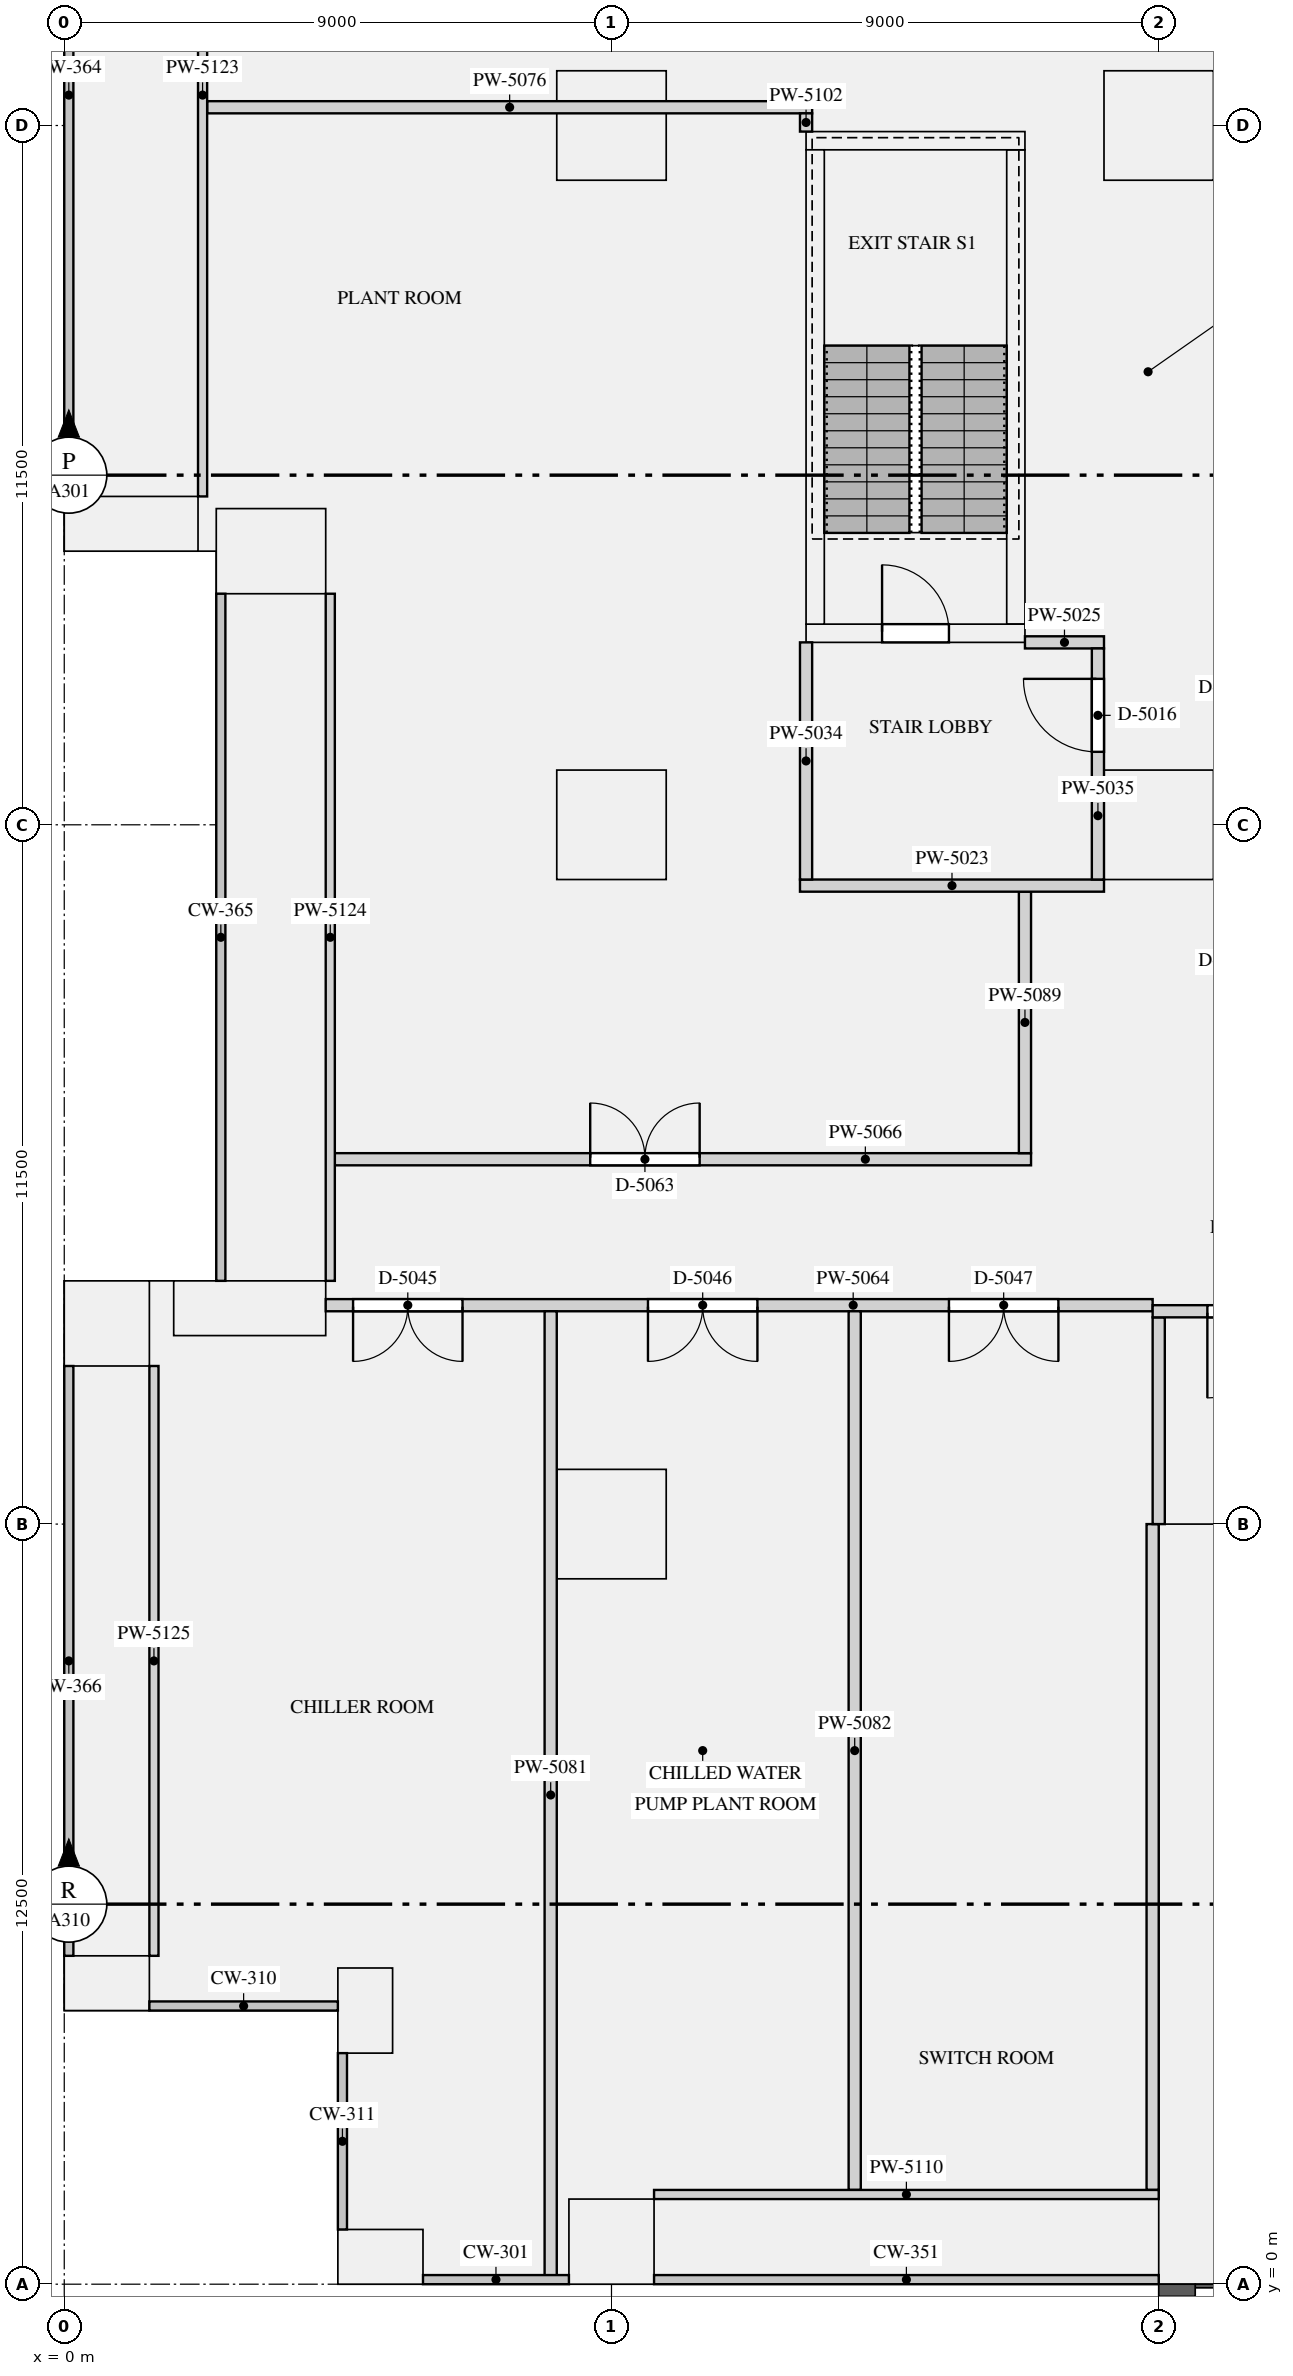
"""IFC4 building model, lengths in metres.
Left out: names, types, materials, properties, quantities, classifications, styles, units other than length and angle.
Written with IfcOpenShell. Run it as: python <this file> out.ifc"""

import sys

from ifc_helpers import new_model, si_unit, direction, frame, frame_2d, origin, origin_2d, place, context, subcontext, project, spatial, rectangle, extrude, element, fill, save


model = new_model("IFC4")
c1 = context("Model", 3, precision=1e-05, world=origin(), true_north=direction((0.0, 1.0)))
c2 = subcontext(c1, "Body", "Model", "MODEL_VIEW")
j1 = project(units=[si_unit("LENGTHUNIT", "METRE"), si_unit("PLANEANGLEUNIT", "RADIAN")], contexts=[c1])
p1 = place(None, origin())
s1 = spatial("IfcSite", under=j1, at=p1, CompositionType="ELEMENT")
p2 = place(p1, origin())
s2 = spatial("IfcBuilding", under=s1, at=p2, CompositionType="ELEMENT")
p3 = place(p2, frame((0.0, 0.0, 15.5)))
s3 = spatial("IfcBuildingStorey", under=s2, at=p3, CompositionType="ELEMENT", Elevation=15.5)
p4 = place(p3, frame((9.0, 0.7, 0.0), z_axis=(0.0, 0.0, 1.0), x_axis=(1.0, 0.0, 0.0)))
e1 = element("IfcColumn", 1, at=p4, inside=s3, PredefinedType="USERDEFINED", context=c2, shape_type="SweptSolid", body=[
    extrude(rectangle(XDim=1.4, YDim=1.4, at=origin_2d()), origin(), (0.0, 0.0, 1.0), 4.0),
])
p5 = place(p3, frame((1.1, 28.95, 0.0), z_axis=(0.0, 0.0, 1.0), x_axis=(1.0, 0.0, 0.0)))
e2 = element("IfcColumn", 2, at=p5, inside=s3, PredefinedType="USERDEFINED", context=c2, shape_type="SweptSolid", body=[
    extrude(rectangle(XDim=2.2, YDim=0.9, at=origin_2d()), origin(), (0.0, 0.0, 1.0), 4.0),
])
p6 = place(p3, frame((3.4, 28.5, 0.0), z_axis=(0.0, 0.0, 1.0), x_axis=(0.0, -1.0, 0.0)))
e3 = element("IfcColumn", 3, at=p6, inside=s3, PredefinedType="USERDEFINED", context=c2, shape_type="SweptSolid", body=[
    extrude(rectangle(XDim=1.4, YDim=1.8, at=origin_2d()), origin(), (0.0, 0.0, 1.0), 4.0),
])
p7 = place(p3, frame((3.05, 16.05, 0.0), z_axis=(0.0, 0.0, 1.0), x_axis=(-1.0, 0.0, 0.0)))
e4 = element("IfcColumn", 4, at=p7, inside=s3, PredefinedType="USERDEFINED", context=c2, shape_type="SweptSolid", body=[
    extrude(rectangle(XDim=2.5, YDim=0.9, at=origin_2d()), origin(), (0.0, 0.0, 1.0), 4.0),
])
p8 = place(p3, frame((0.7, 15.8, 0.0), z_axis=(0.0, 0.0, 1.0), x_axis=(0.0, -1.0, 0.0)))
e5 = element("IfcColumn", 5, at=p8, inside=s3, PredefinedType="USERDEFINED", context=c2, shape_type="SweptSolid", body=[
    extrude(rectangle(XDim=1.4, YDim=1.4, at=origin_2d()), origin(), (0.0, 0.0, 1.0), 4.0),
])
for number, where, z_axis, x_axis in (
    (6, (0.7, 4.95, 0.0), (0.0, 0.0, 1.0), (1.0, 0.0, 0.0)),
    (7, (4.95, 4.5, 0.0), (0.0, 0.0, 1.0), (0.0, -1.0, 0.0)),
    (8, (5.2, 0.45, 0.0), (0.0, 0.0, 1.0), (1.0, 0.0, 0.0)),
):
    element("IfcColumn", number, at=place(p3, frame(where, z_axis=z_axis, x_axis=x_axis)), inside=s3, PredefinedType="USERDEFINED", context=c2, shape_type="SweptSolid", body=[
        extrude(rectangle(XDim=1.4, YDim=0.9, at=origin_2d()), origin(), (0.0, 0.0, 1.0), 4.0),
    ])
for number, where, z_axis, x_axis in (
    (9, (9.0, 12.5, 0.0), (0.0, 0.0, 1.0), (1.0, 0.0, 0.0)),
    (10, (9.0, 24.0, 0.0), (0.0, 0.0, 1.0), (1.0, 0.0, 0.0)),
    (11, (9.0, 35.5, 0.0), (0.0, 0.0, 1.0), (1.0, 0.0, 0.0)),
    (12, (18.0, 24.0, 0.0), (0.0, 0.0, 1.0), (1.0, 0.0, 0.0)),
    (13, (18.0, 35.5, 0.0), (0.0, 0.0, 1.0), (1.0, 0.0, 0.0)),
):
    element("IfcColumn", number, at=place(p3, frame(where, z_axis=z_axis, x_axis=x_axis)), inside=s3, PredefinedType="COLUMN", context=c2, shape_type="SweptSolid", body=[
        extrude(rectangle(XDim=1.8, YDim=1.8, at=origin_2d()), origin(), (0.0, 0.0, 1.0), 4.0),
    ])
p9 = place(p3, frame((18.5, 0.0, 0.0), z_axis=(0.0, 0.0, 1.0), x_axis=(0.0, 1.0, 0.0)))
e14 = element("IfcWall", 14, at=p9, inside=s3, PredefinedType="SHEAR", context=c2, shape_type="SweptSolid", body=[
    extrude(rectangle(XDim=12.5, YDim=1.0, at=frame_2d((6.25, 0.0))), origin(), (0.0, 0.0, 1.0), 4.0),
])
p10 = place(p3, frame((12.2, 27.15, 0.0), z_axis=(0.0, 0.0, 1.0), x_axis=(1.0, 0.0, 0.0)))
e15 = element("IfcWall", 15, at=p10, inside=s3, PredefinedType="SHEAR", context=c2, shape_type="SweptSolid", body=[
    extrude(rectangle(XDim=3.6, YDim=0.3, at=frame_2d((1.8, 0.0))), origin(), (0.0, 0.0, 1.0), 4.0),
])
p11 = place(p10, frame((1.25, 0.0, 0.0)))
e16 = element("IfcOpeningElement", 16, at=p11, cuts=e15, PredefinedType="OPENING", context=c2, shape_type="SweptSolid", body=[
    extrude(rectangle(XDim=1.1, YDim=2.1, at=frame_2d((0.55, 1.05))), frame((0.0, 0.16, 0.0), z_axis=(0.0, -1.0, 0.0), x_axis=(1.0, 0.0, 0.0)), (0.0, 0.0, 1.0), 0.32),
])
p12 = place(p3, frame((12.2, 35.25, 0.0), z_axis=(0.0, 0.0, 1.0), x_axis=(1.0, 0.0, 0.0)))
e17 = element("IfcWall", 17, at=p12, inside=s3, PredefinedType="SHEAR", context=c2, shape_type="SweptSolid", body=[
    extrude(rectangle(XDim=3.6, YDim=0.3, at=frame_2d((1.8, 0.0))), origin(), (0.0, 0.0, 1.0), 4.0),
])
for number, where, z_axis, x_axis in (
    (18, (12.35, 27.3, 0.0), (0.0, 0.0, 1.0), (0.0, 1.0, 0.0)),
    (19, (15.65, 27.3, 0.0), (0.0, 0.0, 1.0), (0.0, 1.0, 0.0)),
):
    element("IfcWall", number, at=place(p3, frame(where, z_axis=z_axis, x_axis=x_axis)), inside=s3, PredefinedType="SHEAR", context=c2, shape_type="SweptSolid", body=[
        extrude(rectangle(XDim=7.8, YDim=0.3, at=frame_2d((3.9, 0.0))), origin(), (0.0, 0.0, 1.0), 4.0),
    ])
p13 = place(p3, frame((12.1, 23.0, 0.0), z_axis=(0.0, 0.0, 1.0), x_axis=(1.0, 0.0, 0.0)))
e20 = element("IfcWall", 20, at=p13, inside=s3, PredefinedType="PARTITIONING", context=c2, shape_type="SweptSolid", body=[
    extrude(rectangle(XDim=5.0, YDim=0.2, at=frame_2d((2.5, 0.0))), origin(), (0.0, 0.0, 1.0), 3.68),
])
p14 = place(p3, frame((15.8, 27.0, 0.0), z_axis=(0.0, 0.0, 1.0), x_axis=(1.0, 0.0, 0.0)))
e21 = element("IfcWall", 21, at=p14, inside=s3, PredefinedType="PARTITIONING", context=c2, shape_type="SweptSolid", body=[
    extrude(rectangle(XDim=1.3, YDim=0.2, at=frame_2d((0.65, 0.0))), origin(), (0.0, 0.0, 1.0), 3.68),
])
p15 = place(p3, frame((18.0, 12.5, 0.0), z_axis=(0.0, 0.0, 1.0), x_axis=(0.0, 1.0, 0.0)))
e22 = element("IfcWall", 22, at=p15, inside=s3, PredefinedType="PARTITIONING", context=c2, shape_type="SweptSolid", body=[
    extrude(rectangle(XDim=3.4, YDim=0.2, at=frame_2d((1.7, 0.0))), origin(), (0.0, 0.0, 1.0), 3.68),
])
p16 = place(p3, frame((12.2, 23.1, 0.0), z_axis=(0.0, 0.0, 1.0), x_axis=(0.0, 1.0, 0.0)))
e23 = element("IfcWall", 23, at=p16, inside=s3, PredefinedType="PARTITIONING", context=c2, shape_type="SweptSolid", body=[
    extrude(rectangle(XDim=3.9, YDim=0.2, at=frame_2d((1.95, 0.0))), origin(), (0.0, 0.0, 1.0), 3.68),
])
p17 = place(p3, frame((17.0, 23.1, 0.0), z_axis=(0.0, 0.0, 1.0), x_axis=(0.0, 1.0, 0.0)))
e24 = element("IfcWall", 24, at=p17, inside=s3, PredefinedType="PARTITIONING", context=c2, shape_type="SweptSolid", body=[
    extrude(rectangle(XDim=3.8, YDim=0.2, at=frame_2d((1.9, 0.0))), origin(), (0.0, 0.0, 1.0), 3.68),
])
p18 = place(p17, frame((2.1, 0.0, 0.0)))
e25 = element("IfcOpeningElement", 25, at=p18, cuts=e24, PredefinedType="OPENING", context=c2, shape_type="SweptSolid", body=[
    extrude(rectangle(XDim=1.2, YDim=2.1, at=frame_2d((0.6, 1.05))), frame((0.0, 0.11, 0.0), z_axis=(0.0, -1.0, 0.0), x_axis=(1.0, 0.0, 0.0)), (0.0, 0.0, 1.0), 0.22),
])
p19 = place(p3, frame((17.9, 16.0, 0.0), z_axis=(0.0, 0.0, 1.0), x_axis=(1.0, 0.0, 0.0)))
e26 = element("IfcWall", 26, at=p19, inside=s3, PredefinedType="PARTITIONING", context=c2, shape_type="SweptSolid", body=[
    extrude(rectangle(XDim=36.2, YDim=0.2, at=frame_2d((18.1, 0.0))), origin(), (0.0, 0.0, 1.0), 3.68),
])
p20 = place(p19, frame((0.9, 0.0, 0.0)))
e27 = element("IfcOpeningElement", 27, at=p20, cuts=e26, PredefinedType="OPENING", context=c2, shape_type="SweptSolid", body=[
    extrude(rectangle(XDim=1.4, YDim=2.1, at=frame_2d((0.7, 1.05))), frame((0.0, 0.11, 0.0), z_axis=(0.0, -1.0, 0.0), x_axis=(1.0, 0.0, 0.0)), (0.0, 0.0, 1.0), 0.22),
])
p21 = place(p19, frame((33.9, 0.0, 0.0)))
e28 = element("IfcOpeningElement", 28, at=p21, cuts=e26, PredefinedType="OPENING", context=c2, shape_type="SweptSolid", body=[
    extrude(rectangle(XDim=1.4, YDim=2.1, at=frame_2d((0.7, 1.05))), frame((0.0, 0.11, 0.0), z_axis=(0.0, -1.0, 0.0), x_axis=(1.0, 0.0, 0.0)), (0.0, 0.0, 1.0), 0.22),
])
p22 = place(p3, frame((4.3, 16.1, 0.0), z_axis=(0.0, 0.0, 1.0), x_axis=(1.0, 0.0, 0.0)))
e29 = element("IfcWall", 29, at=p22, inside=s3, PredefinedType="PARTITIONING", context=c2, shape_type="SweptSolid", body=[
    extrude(rectangle(XDim=13.6, YDim=0.2, at=frame_2d((6.8, 0.0))), origin(), (0.0, 0.0, 1.0), 3.68),
])
p23 = place(p22, frame((0.45, 0.0, 0.0)))
e30 = element("IfcOpeningElement", 30, at=p23, cuts=e29, PredefinedType="OPENING", context=c2, shape_type="SweptSolid", body=[
    extrude(rectangle(XDim=1.8, YDim=2.1, at=frame_2d((0.9, 1.05))), frame((0.0, 0.11, 0.0), z_axis=(0.0, -1.0, 0.0), x_axis=(1.0, 0.0, 0.0)), (0.0, 0.0, 1.0), 0.22),
])
p24 = place(p22, frame((5.3, 0.0, 0.0)))
e31 = element("IfcOpeningElement", 31, at=p24, cuts=e29, PredefinedType="OPENING", context=c2, shape_type="SweptSolid", body=[
    extrude(rectangle(XDim=1.8, YDim=2.1, at=frame_2d((0.9, 1.05))), frame((0.0, 0.11, 0.0), z_axis=(0.0, -1.0, 0.0), x_axis=(1.0, 0.0, 0.0)), (0.0, 0.0, 1.0), 0.22),
])
p25 = place(p22, frame((10.25, 0.0, 0.0)))
e32 = element("IfcOpeningElement", 32, at=p25, cuts=e29, PredefinedType="OPENING", context=c2, shape_type="SweptSolid", body=[
    extrude(rectangle(XDim=1.8, YDim=2.1, at=frame_2d((0.9, 1.05))), frame((0.0, 0.11, 0.0), z_axis=(0.0, -1.0, 0.0), x_axis=(1.0, 0.0, 0.0)), (0.0, 0.0, 1.0), 0.22),
])
p26 = place(p3, frame((4.45, 18.5, 0.0), z_axis=(0.0, 0.0, 1.0), x_axis=(1.0, 0.0, 0.0)))
e33 = element("IfcWall", 33, at=p26, inside=s3, PredefinedType="PARTITIONING", context=c2, shape_type="SweptSolid", body=[
    extrude(rectangle(XDim=11.45, YDim=0.2, at=frame_2d((5.725, 0.0))), origin(), (0.0, 0.0, 1.0), 3.68),
])
p27 = place(p26, frame((4.2, 0.0, 0.0)))
e34 = element("IfcOpeningElement", 34, at=p27, cuts=e33, PredefinedType="OPENING", context=c2, shape_type="SweptSolid", body=[
    extrude(rectangle(XDim=1.8, YDim=2.1, at=frame_2d((0.9, 1.05))), frame((0.0, 0.11, 0.0), z_axis=(0.0, -1.0, 0.0), x_axis=(1.0, 0.0, 0.0)), (0.0, 0.0, 1.0), 0.22),
])
p28 = place(p3, frame((2.35, 35.8, 0.0), z_axis=(0.0, 0.0, 1.0), x_axis=(1.0, 0.0, 0.0)))
e35 = element("IfcWall", 35, at=p28, inside=s3, PredefinedType="PARTITIONING", context=c2, shape_type="SweptSolid", body=[
    extrude(rectangle(XDim=9.95, YDim=0.2, at=frame_2d((4.975, 0.0))), origin(), (0.0, 0.0, 1.0), 3.68),
])
p29 = place(p3, frame((8.0, 0.09, 0.0), z_axis=(0.0, 0.0, 1.0), x_axis=(0.0, 1.0, 0.0)))
e36 = element("IfcWall", 36, at=p29, inside=s3, PredefinedType="PARTITIONING", context=c2, shape_type="SweptSolid", body=[
    extrude(rectangle(XDim=15.91, YDim=0.2, at=frame_2d((7.955, 0.0))), origin(), (0.0, 0.0, 1.0), 3.68),
])
p30 = place(p3, frame((13.0, 1.55, 0.0), z_axis=(0.0, 0.0, 1.0), x_axis=(0.0, 1.0, 0.0)))
e37 = element("IfcWall", 37, at=p30, inside=s3, PredefinedType="PARTITIONING", context=c2, shape_type="SweptSolid", body=[
    extrude(rectangle(XDim=14.45, YDim=0.2, at=frame_2d((7.225, 0.0))), origin(), (0.0, 0.0, 1.0), 3.68),
])
p31 = place(p3, frame((17.9, 1.55, 0.0), z_axis=(0.0, 0.0, 1.0), x_axis=(0.0, 1.0, 0.0)))
e38 = element("IfcWall", 38, at=p31, inside=s3, PredefinedType="PARTITIONING", context=c2, shape_type="SweptSolid", body=[
    extrude(rectangle(XDim=10.95, YDim=0.2, at=frame_2d((5.475, 0.0))), origin(), (0.0, 0.0, 1.0), 3.68),
])
p32 = place(p3, frame((15.8, 18.6, 0.0), z_axis=(0.0, 0.0, 1.0), x_axis=(0.0, 1.0, 0.0)))
e39 = element("IfcWall", 39, at=p32, inside=s3, PredefinedType="PARTITIONING", context=c2, shape_type="SweptSolid", body=[
    extrude(rectangle(XDim=4.3, YDim=0.2, at=frame_2d((2.15, 0.0))), origin(), (0.0, 0.0, 1.0), 3.68),
])
p33 = place(p3, frame((12.2, 35.4, 0.0), z_axis=(0.0, 0.0, 1.0), x_axis=(0.0, 1.0, 0.0)))
e40 = element("IfcWall", 40, at=p33, inside=s3, PredefinedType="PARTITIONING", context=c2, shape_type="SweptSolid", body=[
    extrude(rectangle(XDim=0.3, YDim=0.2, at=frame_2d((0.15, 0.0))), origin(), (0.0, 0.0, 1.0), 3.68),
])
p34 = place(p3, frame((9.7, 1.475, 0.0), z_axis=(0.0, 0.0, 1.0), x_axis=(1.0, 0.0, 0.0)))
e41 = element("IfcWall", 41, at=p34, inside=s3, PredefinedType="PARTITIONING", context=c2, shape_type="SweptSolid", body=[
    extrude(rectangle(XDim=8.3, YDim=0.15, at=frame_2d((4.15, 0.0))), origin(), (0.0, 0.0, 1.0), 3.68),
])
p35 = place(p3, frame((2.275, 29.4, 0.0), z_axis=(0.0, 0.0, 1.0), x_axis=(0.0, 1.0, 0.0)))
e42 = element("IfcWall", 42, at=p35, inside=s3, PredefinedType="PARTITIONING", context=c2, shape_type="SweptSolid", body=[
    extrude(rectangle(XDim=13.2, YDim=0.15, at=frame_2d((6.6, 0.0))), origin(), (0.0, 0.0, 1.0), 3.68),
])
p36 = place(p3, frame((4.375, 16.5, 0.0), z_axis=(0.0, 0.0, 1.0), x_axis=(0.0, 1.0, 0.0)))
e43 = element("IfcWall", 43, at=p36, inside=s3, PredefinedType="PARTITIONING", context=c2, shape_type="SweptSolid", body=[
    extrude(rectangle(XDim=11.3, YDim=0.15, at=frame_2d((5.65, 0.0))), origin(), (0.0, 0.0, 1.0), 3.68),
])
p37 = place(p3, frame((1.475, 5.4, 0.0), z_axis=(0.0, 0.0, 1.0), x_axis=(0.0, 1.0, 0.0)))
e44 = element("IfcWall", 44, at=p37, inside=s3, PredefinedType="PARTITIONING", context=c2, shape_type="SweptSolid", body=[
    extrude(rectangle(XDim=9.7, YDim=0.15, at=frame_2d((4.85, 0.0))), origin(), (0.0, 0.0, 1.0), 3.68),
])
p38 = place(p11, origin())
e45 = element("IfcDoor", 45, at=p38, inside=s3, OperationType="SINGLE_SWING_LEFT", PredefinedType="DOOR", context=c2, shape_type="SweptSolid", body=[
    extrude(rectangle(XDim=1.1, YDim=2.1, at=frame_2d((0.55, 1.05))), frame((0.0, 0.025, 0.0), z_axis=(0.0, -1.0, 0.0), x_axis=(1.0, 0.0, 0.0)), (0.0, 0.0, 1.0), 0.05),
])
fill(e16, e45)
p39 = place(p18, origin())
e46 = element("IfcDoor", 46, at=p39, inside=s3, OperationType="SINGLE_SWING_RIGHT", PredefinedType="DOOR", context=c2, shape_type="SweptSolid", body=[
    extrude(rectangle(XDim=1.2, YDim=2.1, at=frame_2d((0.6, 1.05))), frame((0.0, 0.025, 0.0), z_axis=(0.0, -1.0, 0.0), x_axis=(1.0, 0.0, 0.0)), (0.0, 0.0, 1.0), 0.05),
])
fill(e25, e46)
p40 = place(p20, frame((1.4, 0.0, 0.0), z_axis=(0.0, 0.0, 1.0), x_axis=(-1.0, 0.0, 0.0)))
e47 = element("IfcDoor", 47, at=p40, inside=s3, OperationType="SINGLE_SWING_RIGHT", PredefinedType="DOOR", context=c2, shape_type="SweptSolid", body=[
    extrude(rectangle(XDim=1.4, YDim=2.1, at=frame_2d((0.7, 1.05))), frame((0.0, 0.025, 0.0), z_axis=(0.0, -1.0, 0.0), x_axis=(1.0, 0.0, 0.0)), (0.0, 0.0, 1.0), 0.05),
])
fill(e27, e47)
p41 = place(p23, frame((1.8, 0.0, 0.0), z_axis=(0.0, 0.0, 1.0), x_axis=(-1.0, 0.0, 0.0)))
e48 = element("IfcDoor", 48, at=p41, inside=s3, OperationType="DOUBLE_DOOR_SINGLE_SWING", PredefinedType="DOOR", context=c2, shape_type="SweptSolid", body=[
    extrude(rectangle(XDim=1.8, YDim=2.1, at=frame_2d((0.9, 1.05))), frame((0.0, 0.025, 0.0), z_axis=(0.0, -1.0, 0.0), x_axis=(1.0, 0.0, 0.0)), (0.0, 0.0, 1.0), 0.05),
])
fill(e30, e48)
p42 = place(p24, frame((1.8, 0.0, 0.0), z_axis=(0.0, 0.0, 1.0), x_axis=(-1.0, 0.0, 0.0)))
e49 = element("IfcDoor", 49, at=p42, inside=s3, OperationType="DOUBLE_DOOR_SINGLE_SWING", PredefinedType="DOOR", context=c2, shape_type="SweptSolid", body=[
    extrude(rectangle(XDim=1.8, YDim=2.1, at=frame_2d((0.9, 1.05))), frame((0.0, 0.025, 0.0), z_axis=(0.0, -1.0, 0.0), x_axis=(1.0, 0.0, 0.0)), (0.0, 0.0, 1.0), 0.05),
])
fill(e31, e49)
p43 = place(p25, frame((1.8, 0.0, 0.0), z_axis=(0.0, 0.0, 1.0), x_axis=(-1.0, 0.0, 0.0)))
e50 = element("IfcDoor", 50, at=p43, inside=s3, OperationType="DOUBLE_DOOR_SINGLE_SWING", PredefinedType="DOOR", context=c2, shape_type="SweptSolid", body=[
    extrude(rectangle(XDim=1.8, YDim=2.1, at=frame_2d((0.9, 1.05))), frame((0.0, 0.025, 0.0), z_axis=(0.0, -1.0, 0.0), x_axis=(1.0, 0.0, 0.0)), (0.0, 0.0, 1.0), 0.05),
])
fill(e32, e50)
p44 = place(p27, origin())
e51 = element("IfcDoor", 51, at=p44, inside=s3, OperationType="DOUBLE_DOOR_SINGLE_SWING", PredefinedType="DOOR", context=c2, shape_type="SweptSolid", body=[
    extrude(rectangle(XDim=1.8, YDim=2.1, at=frame_2d((0.9, 1.05))), frame((0.0, 0.025, 0.0), z_axis=(0.0, -1.0, 0.0), x_axis=(1.0, 0.0, 0.0)), (0.0, 0.0, 1.0), 0.05),
])
fill(e34, e51)
save(model, sys.argv[1])
